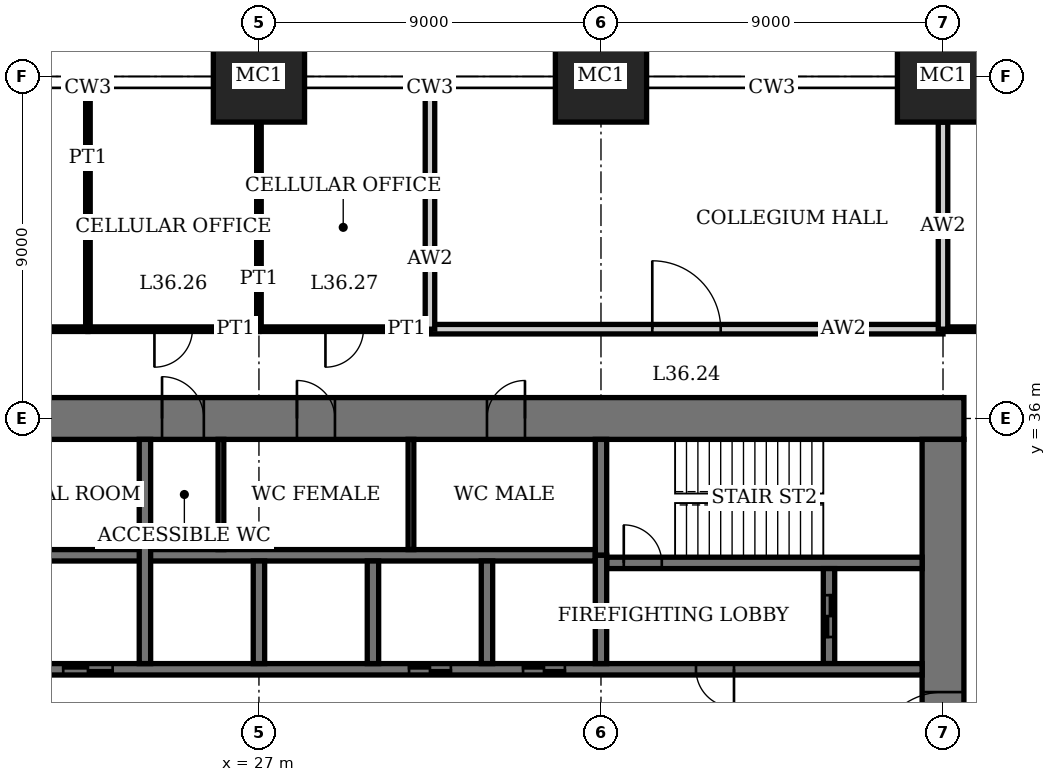
"""IFC4 building model, lengths in metres.
Left out: names, types, materials, properties, quantities, classifications, styles, units other than length and angle.
Written with IfcOpenShell. Run it as: python <this file> out.ifc"""

import sys

from ifc_helpers import new_model, si_unit, direction, frame, frame_2d, origin, origin_2d, place, context, subcontext, project, spatial, rectangle, extrude, element, fill, save


model = new_model("IFC4")
c1 = context("Model", 3, precision=1e-05, world=origin(), true_north=direction((0.0, 1.0)))
c2 = subcontext(c1, "Body", "Model", "MODEL_VIEW")
j1 = project(units=[si_unit("LENGTHUNIT", "METRE"), si_unit("PLANEANGLEUNIT", "RADIAN")], contexts=[c1])
p1 = place(None, origin())
s1 = spatial("IfcSite", under=j1, at=p1, CompositionType="ELEMENT")
p2 = place(p1, origin())
s2 = spatial("IfcBuilding", under=s1, at=p2, CompositionType="ELEMENT")
p3 = place(p2, frame((0.0, 0.0, 149.0)))
s3 = spatial("IfcBuildingStorey", under=s2, at=p3, CompositionType="ELEMENT", Elevation=149.0)
for number, where, z_axis, x_axis in (
    (1, (27.0, 45.0, 0.0), (0.0, 0.0, 1.0), (1.0, 0.0, 0.0)),
    (2, (36.0, 45.0, 0.0), (0.0, 0.0, 1.0), (1.0, 0.0, 0.0)),
    (3, (45.0, 45.0, 0.0), (0.0, 0.0, 1.0), (1.0, 0.0, 0.0)),
):
    element("IfcColumn", number, at=place(p3, frame(where, z_axis=z_axis, x_axis=x_axis)), inside=s3, PredefinedType="COLUMN", context=c2, shape_type="SweptSolid", body=[
        extrude(rectangle(XDim=2.4, YDim=2.4, at=origin_2d()), origin(), (0.0, 0.0, 1.0), 4.0),
    ])
p4 = place(p3, frame((45.55, 36.0, 0.0), z_axis=(0.0, 0.0, 1.0), x_axis=(-1.0, 0.0, 0.0)))
e4 = element("IfcWall", 4, at=p4, inside=s3, PredefinedType="SHEAR", context=c2, shape_type="SweptSolid", body=[
    extrude(rectangle(XDim=28.1, YDim=1.1, at=frame_2d((14.05, 0.0))), origin(), (0.0, 0.0, 1.0), 4.0),
])
p5 = place(p4, frame((11.55, 0.0, 0.0)))
e5 = element("IfcOpeningElement", 5, at=p5, cuts=e4, PredefinedType="OPENING", context=c2, shape_type="SweptSolid", body=[
    extrude(rectangle(XDim=1.0, YDim=2.4, at=frame_2d((0.5, 1.2))), frame((0.0, 0.56, 0.0), z_axis=(0.0, -1.0, 0.0), x_axis=(1.0, 0.0, 0.0)), (0.0, 0.0, 1.0), 1.12),
])
p6 = place(p4, frame((16.55, 0.0, 0.0)))
e6 = element("IfcOpeningElement", 6, at=p6, cuts=e4, PredefinedType="OPENING", context=c2, shape_type="SweptSolid", body=[
    extrude(rectangle(XDim=1.0, YDim=2.4, at=frame_2d((0.5, 1.2))), frame((0.0, 0.56, 0.0), z_axis=(0.0, -1.0, 0.0), x_axis=(1.0, 0.0, 0.0)), (0.0, 0.0, 1.0), 1.12),
])
p7 = place(p4, frame((20.0, 0.0, 0.0)))
e7 = element("IfcOpeningElement", 7, at=p7, cuts=e4, PredefinedType="OPENING", context=c2, shape_type="SweptSolid", body=[
    extrude(rectangle(XDim=1.1, YDim=2.4, at=frame_2d((0.55, 1.2))), frame((0.0, 0.56, 0.0), z_axis=(0.0, -1.0, 0.0), x_axis=(1.0, 0.0, 0.0)), (0.0, 0.0, 1.0), 1.12),
])
p8 = place(p4, frame((24.05, 0.0, 0.0)))
e8 = element("IfcOpeningElement", 8, at=p8, cuts=e4, PredefinedType="OPENING", context=c2, shape_type="SweptSolid", body=[
    extrude(rectangle(XDim=1.0, YDim=2.4, at=frame_2d((0.5, 1.2))), frame((0.0, 0.56, 0.0), z_axis=(0.0, -1.0, 0.0), x_axis=(1.0, 0.0, 0.0)), (0.0, 0.0, 1.0), 1.12),
])
p9 = place(p3, frame((45.0, 18.55, 0.0), z_axis=(0.0, 0.0, 1.0), x_axis=(0.0, 1.0, 0.0)))
e9 = element("IfcWall", 9, at=p9, inside=s3, PredefinedType="SHEAR", context=c2, shape_type="SweptSolid", body=[
    extrude(rectangle(XDim=16.9, YDim=1.1, at=frame_2d((8.45, 0.0))), origin(), (0.0, 0.0, 1.0), 4.0),
])
p10 = place(p9, frame((8.45, 0.0, 0.0)))
e10 = element("IfcOpeningElement", 10, at=p10, cuts=e9, PredefinedType="OPENING", context=c2, shape_type="SweptSolid", body=[
    extrude(rectangle(XDim=1.8, YDim=2.4, at=frame_2d((0.9, 1.2))), frame((0.0, 0.56, 0.0), z_axis=(0.0, -1.0, 0.0), x_axis=(1.0, 0.0, 0.0)), (0.0, 0.0, 1.0), 1.12),
])
p11 = place(p3, frame((36.15, 32.2, 0.0), z_axis=(0.0, 0.0, 1.0), x_axis=(1.0, 0.0, 0.0)))
e11 = element("IfcWall", 11, at=p11, inside=s3, PredefinedType="SHEAR", context=c2, shape_type="SweptSolid", body=[
    extrude(rectangle(XDim=8.3, YDim=0.3, at=frame_2d((4.15, 0.0))), origin(), (0.0, 0.0, 1.0), 4.0),
])
p12 = place(p11, frame((0.45, 0.0, 0.0)))
e12 = element("IfcOpeningElement", 12, at=p12, cuts=e11, PredefinedType="OPENING", context=c2, shape_type="SweptSolid", body=[
    extrude(rectangle(XDim=1.0, YDim=2.4, at=frame_2d((0.5, 1.2))), frame((0.0, 0.16, 0.0), z_axis=(0.0, -1.0, 0.0), x_axis=(1.0, 0.0, 0.0)), (0.0, 0.0, 1.0), 0.32),
])
p13 = place(p3, frame((36.0, 32.4, 0.0), z_axis=(0.0, 0.0, 1.0), x_axis=(0.0, 1.0, 0.0)))
e13 = element("IfcWall", 13, at=p13, inside=s3, PredefinedType="SHEAR", context=c2, shape_type="SweptSolid", body=[
    extrude(rectangle(XDim=3.05, YDim=0.3, at=frame_2d((1.525, 0.0))), origin(), (0.0, 0.0, 1.0), 4.0),
])
p14 = place(p3, frame((42.0, 29.55, 0.0), z_axis=(0.0, 0.0, 1.0), x_axis=(0.0, 1.0, 0.0)))
e14 = element("IfcWall", 14, at=p14, inside=s3, PredefinedType="SHEAR", context=c2, shape_type="SweptSolid", body=[
    extrude(rectangle(XDim=2.5, YDim=0.3, at=frame_2d((1.25, 0.0))), origin(), (0.0, 0.0, 1.0), 4.0),
])
p15 = place(p14, frame((0.7, 0.0, 0.0)))
e15 = element("IfcOpeningElement", 15, at=p15, cuts=e14, PredefinedType="OPENING", context=c2, shape_type="SweptSolid", body=[
    extrude(rectangle(XDim=1.1, YDim=2.4, at=frame_2d((0.55, 1.2))), frame((0.0, 0.16, 0.0), z_axis=(0.0, -1.0, 0.0), x_axis=(1.0, 0.0, 0.0)), (0.0, 0.0, 1.0), 0.32),
])
p16 = place(p3, frame((18.55, 29.4, 0.0), z_axis=(0.0, 0.0, 1.0), x_axis=(1.0, 0.0, 0.0)))
e16 = element("IfcWall", 16, at=p16, inside=s3, PredefinedType="SHEAR", context=c2, shape_type="SweptSolid", body=[
    extrude(rectangle(XDim=25.9, YDim=0.3, at=frame_2d((12.95, 0.0))), origin(), (0.0, 0.0, 1.0), 4.0),
])
p17 = place(p16, frame((19.95, 0.0, 0.0)))
e17 = element("IfcOpeningElement", 17, at=p17, cuts=e16, PredefinedType="OPENING", context=c2, shape_type="SweptSolid", body=[
    extrude(rectangle(XDim=1.0, YDim=2.4, at=frame_2d((0.5, 1.2))), frame((0.0, 0.16, 0.0), z_axis=(0.0, -1.0, 0.0), x_axis=(1.0, 0.0, 0.0)), (0.0, 0.0, 1.0), 0.32),
])
p18 = place(p16, frame((0.5, 0.0, 0.0)))
e18 = element("IfcOpeningElement", 18, at=p18, cuts=e16, PredefinedType="OPENING", context=c2, shape_type="SweptSolid", body=[
    extrude(rectangle(XDim=0.9, YDim=2.1, at=frame_2d((0.45, 1.05))), frame((0.0, 0.16, 0.0), z_axis=(0.0, -1.0, 0.0), x_axis=(1.0, 0.0, 0.0)), (0.0, 0.0, 1.0), 0.32),
])
p19 = place(p16, frame((15.4, 0.0, 0.0)))
e19 = element("IfcOpeningElement", 19, at=p19, cuts=e16, PredefinedType="OPENING", context=c2, shape_type="SweptSolid", body=[
    extrude(rectangle(XDim=1.1, YDim=2.4, at=frame_2d((0.55, 1.2))), frame((0.0, 0.16, 0.0), z_axis=(0.0, -1.0, 0.0), x_axis=(1.0, 0.0, 0.0)), (0.0, 0.0, 1.0), 0.32),
])
p20 = place(p16, frame((12.4, 0.0, 0.0)))
e20 = element("IfcOpeningElement", 20, at=p20, cuts=e16, PredefinedType="OPENING", context=c2, shape_type="SweptSolid", body=[
    extrude(rectangle(XDim=1.1, YDim=2.4, at=frame_2d((0.55, 1.2))), frame((0.0, 0.16, 0.0), z_axis=(0.0, -1.0, 0.0), x_axis=(1.0, 0.0, 0.0)), (0.0, 0.0, 1.0), 0.32),
])
p21 = place(p16, frame((3.3, 0.0, 0.0)))
e21 = element("IfcOpeningElement", 21, at=p21, cuts=e16, PredefinedType="OPENING", context=c2, shape_type="SweptSolid", body=[
    extrude(rectangle(XDim=1.3, YDim=2.4, at=frame_2d((0.65, 1.2))), frame((0.0, 0.16, 0.0), z_axis=(0.0, -1.0, 0.0), x_axis=(1.0, 0.0, 0.0)), (0.0, 0.0, 1.0), 0.32),
])
p22 = place(p3, frame((18.55, 32.4, 0.0), z_axis=(0.0, 0.0, 1.0), x_axis=(1.0, 0.0, 0.0)))
e22 = element("IfcWall", 22, at=p22, inside=s3, PredefinedType="SHEAR", context=c2, shape_type="SweptSolid", body=[
    extrude(rectangle(XDim=17.3, YDim=0.3, at=frame_2d((8.65, 0.0))), origin(), (0.0, 0.0, 1.0), 4.0),
])
for number, where, z_axis, x_axis in (
    (23, (33.0, 29.55, 0.0), (0.0, 0.0, 1.0), (0.0, 1.0, 0.0)),
    (24, (30.0, 29.55, 0.0), (0.0, 0.0, 1.0), (0.0, 1.0, 0.0)),
    (25, (27.0, 29.55, 0.0), (0.0, 0.0, 1.0), (0.0, 1.0, 0.0)),
):
    element("IfcWall", number, at=place(p3, frame(where, z_axis=z_axis, x_axis=x_axis)), inside=s3, PredefinedType="SHEAR", context=c2, shape_type="SweptSolid", body=[
        extrude(rectangle(XDim=2.7, YDim=0.3, at=frame_2d((1.35, 0.0))), origin(), (0.0, 0.0, 1.0), 4.0),
    ])
p23 = place(p3, frame((24.0, 29.55, 0.0), z_axis=(0.0, 0.0, 1.0), x_axis=(0.0, 1.0, 0.0)))
e26 = element("IfcWall", 26, at=p23, inside=s3, PredefinedType="SHEAR", context=c2, shape_type="SweptSolid", body=[
    extrude(rectangle(XDim=5.9, YDim=0.3, at=frame_2d((2.95, 0.0))), origin(), (0.0, 0.0, 1.0), 4.0),
])
p24 = place(p3, frame((36.0, 29.55, 0.0), z_axis=(0.0, 0.0, 1.0), x_axis=(0.0, 1.0, 0.0)))
e27 = element("IfcWall", 27, at=p24, inside=s3, PredefinedType="SHEAR", context=c2, shape_type="SweptSolid", body=[
    extrude(rectangle(XDim=2.85, YDim=0.3, at=frame_2d((1.425, 0.0))), origin(), (0.0, 0.0, 1.0), 4.0),
])
p25 = place(p3, frame((31.5, 38.35, 0.0), z_axis=(0.0, 0.0, 1.0), x_axis=(1.0, 0.0, 0.0)))
e28 = element("IfcWall", 28, at=p25, inside=s3, PredefinedType="PARTITIONING", context=c2, shape_type="SweptSolid", body=[
    extrude(rectangle(XDim=13.5, YDim=0.25, at=frame_2d((6.75, 0.0))), origin(), (0.0, 0.0, 1.0), 3.75),
])
p26 = place(p25, frame((5.85, 0.0, 0.0)))
e29 = element("IfcOpeningElement", 29, at=p26, cuts=e28, PredefinedType="OPENING", context=c2, shape_type="SweptSolid", body=[
    extrude(rectangle(XDim=1.8, YDim=2.4, at=frame_2d((0.9, 1.2))), frame((0.0, 0.135, 0.0), z_axis=(0.0, -1.0, 0.0), x_axis=(1.0, 0.0, 0.0)), (0.0, 0.0, 1.0), 0.27),
])
p27 = place(p3, frame((13.3, 38.35, 0.0), z_axis=(0.0, 0.0, 1.0), x_axis=(1.0, 0.0, 0.0)))
e30 = element("IfcWall", 30, at=p27, inside=s3, PredefinedType="PARTITIONING", context=c2, shape_type="SweptSolid", body=[
    extrude(rectangle(XDim=9.2, YDim=0.12, at=frame_2d((4.6, 0.0))), origin(), (0.0, 0.0, 1.0), 3.75),
])
p28 = place(p3, frame((22.5, 38.35, 0.0), z_axis=(0.0, 0.0, 1.0), x_axis=(1.0, 0.0, 0.0)))
e31 = element("IfcWall", 31, at=p28, inside=s3, PredefinedType="PARTITIONING", context=c2, shape_type="SweptSolid", body=[
    extrude(rectangle(XDim=4.5, YDim=0.12, at=frame_2d((2.25, 0.0))), origin(), (0.0, 0.0, 1.0), 3.75),
])
p29 = place(p28, frame((1.75, 0.0, 0.0)))
e32 = element("IfcOpeningElement", 32, at=p29, cuts=e31, PredefinedType="OPENING", context=c2, shape_type="SweptSolid", body=[
    extrude(rectangle(XDim=1.0, YDim=2.4, at=frame_2d((0.5, 1.2))), frame((0.0, 0.07, 0.0), z_axis=(0.0, -1.0, 0.0), x_axis=(1.0, 0.0, 0.0)), (0.0, 0.0, 1.0), 0.14),
])
p30 = place(p3, frame((27.0, 38.35, 0.0), z_axis=(0.0, 0.0, 1.0), x_axis=(1.0, 0.0, 0.0)))
e33 = element("IfcWall", 33, at=p30, inside=s3, PredefinedType="PARTITIONING", context=c2, shape_type="SweptSolid", body=[
    extrude(rectangle(XDim=4.5, YDim=0.12, at=frame_2d((2.25, 0.0))), origin(), (0.0, 0.0, 1.0), 3.75),
])
p31 = place(p30, frame((1.75, 0.0, 0.0)))
e34 = element("IfcOpeningElement", 34, at=p31, cuts=e33, PredefinedType="OPENING", context=c2, shape_type="SweptSolid", body=[
    extrude(rectangle(XDim=1.0, YDim=2.4, at=frame_2d((0.5, 1.2))), frame((0.0, 0.07, 0.0), z_axis=(0.0, -1.0, 0.0), x_axis=(1.0, 0.0, 0.0)), (0.0, 0.0, 1.0), 0.14),
])
p32 = place(p3, frame((45.0, 38.35, 0.0), z_axis=(0.0, 0.0, 1.0), x_axis=(1.0, 0.0, 0.0)))
e35 = element("IfcWall", 35, at=p32, inside=s3, PredefinedType="PARTITIONING", context=c2, shape_type="SweptSolid", body=[
    extrude(rectangle(XDim=9.0, YDim=0.12, at=frame_2d((4.5, 0.0))), origin(), (0.0, 0.0, 1.0), 3.75),
])
p33 = place(p32, frame((4.0, 0.0, 0.0)))
e36 = element("IfcOpeningElement", 36, at=p33, cuts=e35, PredefinedType="OPENING", context=c2, shape_type="SweptSolid", body=[
    extrude(rectangle(XDim=1.0, YDim=2.4, at=frame_2d((0.5, 1.2))), frame((0.0, 0.07, 0.0), z_axis=(0.0, -1.0, 0.0), x_axis=(1.0, 0.0, 0.0)), (0.0, 0.0, 1.0), 0.14),
])
p34 = place(p3, frame((22.5, 38.35, 0.0), z_axis=(0.0, 0.0, 1.0), x_axis=(0.0, 1.0, 0.0)))
e37 = element("IfcWall", 37, at=p34, inside=s3, PredefinedType="PARTITIONING", context=c2, shape_type="SweptSolid", body=[
    extrude(rectangle(XDim=6.34, YDim=0.12, at=frame_2d((3.17, 0.0))), origin(), (0.0, 0.0, 1.0), 3.75),
])
p35 = place(p3, frame((27.0, 38.35, 0.0), z_axis=(0.0, 0.0, 1.0), x_axis=(0.0, 1.0, 0.0)))
e38 = element("IfcWall", 38, at=p35, inside=s3, PredefinedType="PARTITIONING", context=c2, shape_type="SweptSolid", body=[
    extrude(rectangle(XDim=5.45, YDim=0.12, at=frame_2d((2.725, 0.0))), origin(), (0.0, 0.0, 1.0), 3.05),
])
p36 = place(p3, frame((31.5, 38.35, 0.0), z_axis=(0.0, 0.0, 1.0), x_axis=(0.0, 1.0, 0.0)))
e39 = element("IfcWall", 39, at=p36, inside=s3, PredefinedType="PARTITIONING", context=c2, shape_type="SweptSolid", body=[
    extrude(rectangle(XDim=6.34, YDim=0.25, at=frame_2d((3.17, 0.0))), origin(), (0.0, 0.0, 1.0), 3.75),
])
p37 = place(p3, frame((45.0, 38.35, 0.0), z_axis=(0.0, 0.0, 1.0), x_axis=(0.0, 1.0, 0.0)))
e40 = element("IfcWall", 40, at=p37, inside=s3, PredefinedType="PARTITIONING", context=c2, shape_type="SweptSolid", body=[
    extrude(rectangle(XDim=5.45, YDim=0.25, at=frame_2d((2.725, 0.0))), origin(), (0.0, 0.0, 1.0), 3.05),
])
for number, where, z_axis, x_axis in (
    (41, (31.0, 32.55, 0.0), (0.0, 0.0, 1.0), (0.0, 1.0, 0.0)),
    (42, (26.0, 32.55, 0.0), (0.0, 0.0, 1.0), (0.0, 1.0, 0.0)),
):
    element("IfcWall", number, at=place(p3, frame(where, z_axis=z_axis, x_axis=x_axis)), inside=s3, PredefinedType="PARTITIONING", context=c2, shape_type="SweptSolid", body=[
        extrude(rectangle(XDim=2.9, YDim=0.15, at=frame_2d((1.45, 0.0))), origin(), (0.0, 0.0, 1.0), 3.75),
    ])
p38 = place(p10, origin())
e43 = element("IfcDoor", 43, at=p38, inside=s3, OperationType="DOUBLE_DOOR_DOUBLE_SWING", PredefinedType="DOOR", context=c2, shape_type="SweptSolid", body=[
    extrude(rectangle(XDim=1.8, YDim=2.4, at=frame_2d((0.9, 1.2))), frame((0.0, 0.03, 0.0), z_axis=(0.0, -1.0, 0.0), x_axis=(1.0, 0.0, 0.0)), (0.0, 0.0, 1.0), 0.06),
    extrude(rectangle(XDim=0.04, YDim=2.4, at=frame_2d((0.02, 1.2))), frame((0.0, 0.55, 0.0), z_axis=(0.0, -1.0, 0.0), x_axis=(1.0, 0.0, 0.0)), (0.0, 0.0, 1.0), 1.1),
    extrude(rectangle(XDim=0.04, YDim=2.4, at=frame_2d((1.78, 1.2))), frame((0.0, 0.55, 0.0), z_axis=(0.0, -1.0, 0.0), x_axis=(1.0, 0.0, 0.0)), (0.0, 0.0, 1.0), 1.1),
    extrude(rectangle(XDim=1.8, YDim=0.04, at=frame_2d((0.9, 2.38))), frame((0.0, 0.55, 0.0), z_axis=(0.0, -1.0, 0.0), x_axis=(1.0, 0.0, 0.0)), (0.0, 0.0, 1.0), 1.1),
])
fill(e10, e43)
p39 = place(p5, origin())
e44 = element("IfcDoor", 44, at=p39, inside=s3, OperationType="SINGLE_SWING_LEFT", PredefinedType="DOOR", context=c2, shape_type="SweptSolid", body=[
    extrude(rectangle(XDim=1.0, YDim=2.4, at=frame_2d((0.5, 1.2))), frame((0.0, 0.025, 0.0), z_axis=(0.0, -1.0, 0.0), x_axis=(1.0, 0.0, 0.0)), (0.0, 0.0, 1.0), 0.05),
    extrude(rectangle(XDim=0.04, YDim=2.4, at=frame_2d((0.02, 1.2))), frame((0.0, 0.4, 0.0), z_axis=(0.0, -1.0, 0.0), x_axis=(1.0, 0.0, 0.0)), (0.0, 0.0, 1.0), 0.8),
    extrude(rectangle(XDim=0.04, YDim=2.4, at=frame_2d((0.98, 1.2))), frame((0.0, 0.4, 0.0), z_axis=(0.0, -1.0, 0.0), x_axis=(1.0, 0.0, 0.0)), (0.0, 0.0, 1.0), 0.8),
    extrude(rectangle(XDim=1.0, YDim=0.04, at=frame_2d((0.5, 2.38))), frame((0.0, 0.4, 0.0), z_axis=(0.0, -1.0, 0.0), x_axis=(1.0, 0.0, 0.0)), (0.0, 0.0, 1.0), 0.8),
])
fill(e5, e44)
p40 = place(p6, origin())
e45 = element("IfcDoor", 45, at=p40, inside=s3, OperationType="SINGLE_SWING_RIGHT", PredefinedType="DOOR", context=c2, shape_type="SweptSolid", body=[
    extrude(rectangle(XDim=1.0, YDim=2.4, at=frame_2d((0.5, 1.2))), frame((0.0, 0.025, 0.0), z_axis=(0.0, -1.0, 0.0), x_axis=(1.0, 0.0, 0.0)), (0.0, 0.0, 1.0), 0.05),
    extrude(rectangle(XDim=0.04, YDim=2.4, at=frame_2d((0.02, 1.2))), frame((0.0, 0.4, 0.0), z_axis=(0.0, -1.0, 0.0), x_axis=(1.0, 0.0, 0.0)), (0.0, 0.0, 1.0), 0.8),
    extrude(rectangle(XDim=0.04, YDim=2.4, at=frame_2d((0.98, 1.2))), frame((0.0, 0.4, 0.0), z_axis=(0.0, -1.0, 0.0), x_axis=(1.0, 0.0, 0.0)), (0.0, 0.0, 1.0), 0.8),
    extrude(rectangle(XDim=1.0, YDim=0.04, at=frame_2d((0.5, 2.38))), frame((0.0, 0.4, 0.0), z_axis=(0.0, -1.0, 0.0), x_axis=(1.0, 0.0, 0.0)), (0.0, 0.0, 1.0), 0.8),
])
fill(e6, e45)
p41 = place(p7, origin())
e46 = element("IfcDoor", 46, at=p41, inside=s3, OperationType="SINGLE_SWING_RIGHT", PredefinedType="DOOR", context=c2, shape_type="SweptSolid", body=[
    extrude(rectangle(XDim=1.1, YDim=2.4, at=frame_2d((0.55, 1.2))), frame((0.0, 0.025, 0.0), z_axis=(0.0, -1.0, 0.0), x_axis=(1.0, 0.0, 0.0)), (0.0, 0.0, 1.0), 0.05),
    extrude(rectangle(XDim=0.04, YDim=2.4, at=frame_2d((0.02, 1.2))), frame((0.0, 0.44, 0.0), z_axis=(0.0, -1.0, 0.0), x_axis=(1.0, 0.0, 0.0)), (0.0, 0.0, 1.0), 0.88),
    extrude(rectangle(XDim=0.04, YDim=2.4, at=frame_2d((1.08, 1.2))), frame((0.0, 0.44, 0.0), z_axis=(0.0, -1.0, 0.0), x_axis=(1.0, 0.0, 0.0)), (0.0, 0.0, 1.0), 0.88),
    extrude(rectangle(XDim=1.1, YDim=0.04, at=frame_2d((0.55, 2.38))), frame((0.0, 0.44, 0.0), z_axis=(0.0, -1.0, 0.0), x_axis=(1.0, 0.0, 0.0)), (0.0, 0.0, 1.0), 0.88),
])
fill(e7, e46)
p42 = place(p12, origin())
e47 = element("IfcDoor", 47, at=p42, inside=s3, OperationType="SINGLE_SWING_RIGHT", PredefinedType="DOOR", context=c2, shape_type="SweptSolid", body=[
    extrude(rectangle(XDim=1.0, YDim=2.4, at=frame_2d((0.5, 1.2))), frame((0.0, 0.03, 0.0), z_axis=(0.0, -1.0, 0.0), x_axis=(1.0, 0.0, 0.0)), (0.0, 0.0, 1.0), 0.06),
])
fill(e12, e47)
p43 = place(p17, origin())
e48 = element("IfcDoor", 48, at=p43, inside=s3, OperationType="SINGLE_SWING_RIGHT", PredefinedType="DOOR", context=c2, shape_type="SweptSolid", body=[
    extrude(rectangle(XDim=1.0, YDim=2.4, at=frame_2d((0.5, 1.2))), frame((0.0, 0.03, 0.0), z_axis=(0.0, -1.0, 0.0), x_axis=(1.0, 0.0, 0.0)), (0.0, 0.0, 1.0), 0.06),
])
fill(e17, e48)
p44 = place(p26, origin())
e49 = element("IfcDoor", 49, at=p44, inside=s3, OperationType="DOUBLE_DOOR_SINGLE_SWING", PredefinedType="DOOR", context=c2, shape_type="SweptSolid", body=[
    extrude(rectangle(XDim=1.8, YDim=2.4, at=frame_2d((0.9, 1.2))), frame((0.0, 0.025, 0.0), z_axis=(0.0, -1.0, 0.0), x_axis=(1.0, 0.0, 0.0)), (0.0, 0.0, 1.0), 0.05),
])
fill(e29, e49)
p45 = place(p29, origin())
e50 = element("IfcDoor", 50, at=p45, inside=s3, OperationType="SINGLE_SWING_LEFT", PredefinedType="DOOR", context=c2, shape_type="SweptSolid", body=[
    extrude(rectangle(XDim=1.0, YDim=2.4, at=frame_2d((0.5, 1.2))), frame((0.0, 0.025, 0.0), z_axis=(0.0, -1.0, 0.0), x_axis=(1.0, 0.0, 0.0)), (0.0, 0.0, 1.0), 0.05),
])
fill(e32, e50)
p46 = place(p31, origin())
e51 = element("IfcDoor", 51, at=p46, inside=s3, OperationType="SINGLE_SWING_LEFT", PredefinedType="DOOR", context=c2, shape_type="SweptSolid", body=[
    extrude(rectangle(XDim=1.0, YDim=2.4, at=frame_2d((0.5, 1.2))), frame((0.0, 0.025, 0.0), z_axis=(0.0, -1.0, 0.0), x_axis=(1.0, 0.0, 0.0)), (0.0, 0.0, 1.0), 0.05),
])
fill(e34, e51)
p47 = place(p19, origin())
e52 = element("IfcDoor", 52, at=p47, inside=s3, OperationType="DOUBLE_DOOR_SLIDING", PredefinedType="DOOR", context=c2, shape_type="SweptSolid", body=[
    extrude(rectangle(XDim=1.1, YDim=2.4, at=frame_2d((0.55, 1.2))), frame((0.0, 0.02, 0.0), z_axis=(0.0, -1.0, 0.0), x_axis=(1.0, 0.0, 0.0)), (0.0, 0.0, 1.0), 0.04),
])
fill(e19, e52)
p48 = place(p20, origin())
e53 = element("IfcDoor", 53, at=p48, inside=s3, OperationType="DOUBLE_DOOR_SLIDING", PredefinedType="DOOR", context=c2, shape_type="SweptSolid", body=[
    extrude(rectangle(XDim=1.1, YDim=2.4, at=frame_2d((0.55, 1.2))), frame((0.0, 0.02, 0.0), z_axis=(0.0, -1.0, 0.0), x_axis=(1.0, 0.0, 0.0)), (0.0, 0.0, 1.0), 0.04),
])
fill(e20, e53)
p49 = place(p21, origin())
e54 = element("IfcDoor", 54, at=p49, inside=s3, OperationType="DOUBLE_DOOR_SLIDING", PredefinedType="DOOR", context=c2, shape_type="SweptSolid", body=[
    extrude(rectangle(XDim=1.3, YDim=2.4, at=frame_2d((0.65, 1.2))), frame((0.0, 0.02, 0.0), z_axis=(0.0, -1.0, 0.0), x_axis=(1.0, 0.0, 0.0)), (0.0, 0.0, 1.0), 0.04),
])
fill(e21, e54)
p50 = place(p15, origin())
e55 = element("IfcDoor", 55, at=p50, inside=s3, OperationType="DOUBLE_DOOR_SLIDING", PredefinedType="DOOR", context=c2, shape_type="SweptSolid", body=[
    extrude(rectangle(XDim=1.1, YDim=2.4, at=frame_2d((0.55, 1.2))), frame((0.0, 0.03, 0.0), z_axis=(0.0, -1.0, 0.0), x_axis=(1.0, 0.0, 0.0)), (0.0, 0.0, 1.0), 0.06),
])
fill(e15, e55)
save(model, sys.argv[1])
